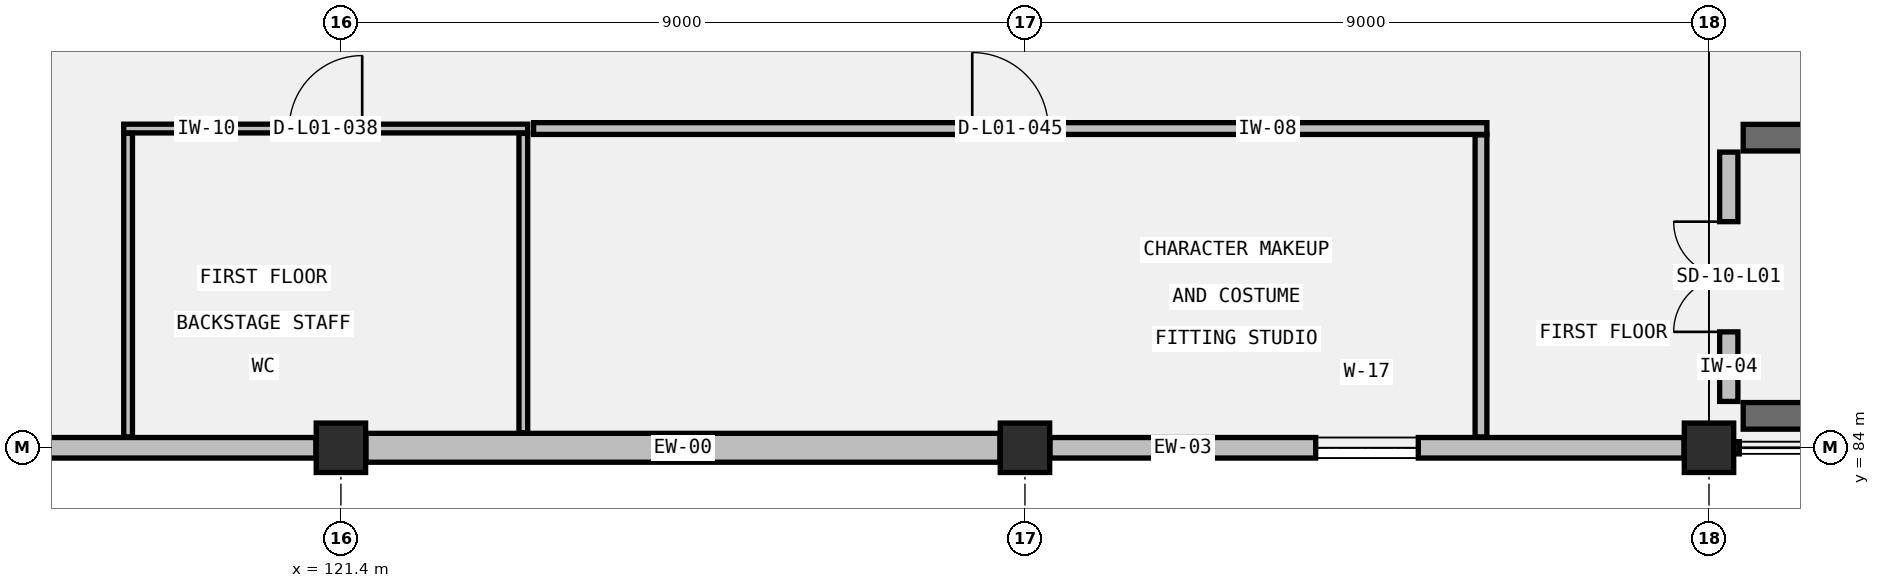
"""IFC4 building model, lengths in metres.
Left out: names, types, materials, properties, quantities, classifications, styles, units other than length and angle.
Written with IfcOpenShell. Run it as: python <this file> out.ifc"""

import sys

from ifc_helpers import new_model, si_unit, direction, frame, frame_2d, origin, origin_2d, place, context, subcontext, project, spatial, rectangle, extrude, element, fill, save


model = new_model("IFC4")
c1 = context("Model", 3, precision=1e-05, world=origin(), true_north=direction((0.0, 1.0)))
c2 = subcontext(c1, "Body", "Model", "MODEL_VIEW")
j1 = project(units=[si_unit("LENGTHUNIT", "METRE"), si_unit("PLANEANGLEUNIT", "RADIAN")], contexts=[c1])
p1 = place(None, origin())
s1 = spatial("IfcSite", under=j1, at=p1, CompositionType="ELEMENT")
p2 = place(p1, origin())
s2 = spatial("IfcBuilding", under=s1, at=p2, CompositionType="ELEMENT")
p3 = place(p2, frame((0.0, 0.0, 5.4)))
s3 = spatial("IfcBuildingStorey", under=s2, at=p3, CompositionType="ELEMENT", Elevation=5.4)
for number, where, z_axis, x_axis in (
    (1, (121.4, 84.0, 0.0), (0.0, 0.0, 1.0), (1.0, 0.0, 0.0)),
    (2, (130.4, 84.0, 0.0), (0.0, 0.0, 1.0), (1.0, 0.0, 0.0)),
    (3, (139.4, 84.0, 0.0), (0.0, 0.0, 1.0), (1.0, 0.0, 0.0)),
):
    element("IfcColumn", number, at=place(p3, frame(where, z_axis=z_axis, x_axis=x_axis)), inside=s3, PredefinedType="COLUMN", context=c2, shape_type="SweptSolid", body=[
        extrude(rectangle(XDim=0.65, YDim=0.65, at=origin_2d()), origin(), (0.0, 0.0, 1.0), 4.6),
    ])
for number, where, z_axis, x_axis in (
    (4, (139.85, 84.42, 0.0), (0.0, 0.0, 1.0), (1.0, 0.0, 0.0)),
    (5, (148.0, 88.08, 0.0), (0.0, 0.0, 1.0), (-1.0, 0.0, 0.0)),
):
    element("IfcWall", number, at=place(p3, frame(where, z_axis=z_axis, x_axis=x_axis)), inside=s3, PredefinedType="SHEAR", context=c2, shape_type="SweptSolid", body=[
        extrude(rectangle(XDim=8.15, YDim=0.35, at=frame_2d((4.075, 0.0))), origin(), (0.0, 0.0, 1.0), 4.36),
    ])
p4 = place(p3, frame((112.854, 84.0, 0.0), z_axis=(0.0, 0.0, 1.0), x_axis=(1.0, 0.0, 0.0)))
e6 = element("IfcWall", 6, at=p4, inside=s3, PredefinedType="STANDARD", context=c2, shape_type="SweptSolid", body=[
    extrude(rectangle(XDim=8.217, YDim=0.27, at=frame_2d((4.108, 0.0))), origin(), (0.0, 0.0, 1.0), 3.898),
])
p5 = place(p4, frame((3.634, 0.0, 0.95)))
e7 = element("IfcOpeningElement", 7, at=p5, cuts=e6, PredefinedType="OPENING", context=c2, shape_type="SweptSolid", body=[
    extrude(rectangle(XDim=0.95, YDim=1.55, at=frame_2d((0.475, 0.775))), frame((0.0, 0.145, 0.0), z_axis=(0.0, -1.0, 0.0), x_axis=(1.0, 0.0, 0.0)), (0.0, 0.0, 1.0), 0.29),
])
p6 = place(p3, frame((121.729, 84.0, 0.0), z_axis=(0.0, 0.0, 1.0), x_axis=(1.0, 0.0, 0.0)))
e8 = element("IfcWall", 8, at=p6, inside=s3, PredefinedType="STANDARD", context=c2, shape_type="SweptSolid", body=[
    extrude(rectangle(XDim=8.342, YDim=0.38, at=frame_2d((4.171, 0.0))), origin(), (0.0, 0.0, 1.0), 3.898),
])
p7 = place(p3, frame((130.729, 84.0, 0.0), z_axis=(0.0, 0.0, 1.0), x_axis=(1.0, 0.0, 0.0)))
e9 = element("IfcWall", 9, at=p7, inside=s3, PredefinedType="STANDARD", context=c2, shape_type="SweptSolid", body=[
    extrude(rectangle(XDim=8.342, YDim=0.27, at=frame_2d((4.171, 0.0))), origin(), (0.0, 0.0, 1.0), 3.898),
])
p8 = place(p7, frame((3.496, 0.0, 0.95)))
e10 = element("IfcOpeningElement", 10, at=p8, cuts=e9, PredefinedType="OPENING", context=c2, shape_type="SweptSolid", body=[
    extrude(rectangle(XDim=1.35, YDim=1.85, at=frame_2d((0.675, 0.925))), frame((0.0, 0.145, 0.0), z_axis=(0.0, -1.0, 0.0), x_axis=(1.0, 0.0, 0.0)), (0.0, 0.0, 1.0), 0.29),
])
p9 = place(p3, frame((139.66, 84.61, 0.0), z_axis=(0.0, 0.0, 1.0), x_axis=(0.0, 1.0, 0.0)))
e11 = element("IfcWall", 11, at=p9, inside=s3, PredefinedType="STANDARD", context=c2, shape_type="SweptSolid", body=[
    extrude(rectangle(XDim=3.28, YDim=0.24, at=frame_2d((1.64, 0.0))), origin(), (0.0, 0.0, 1.0), 4.36),
])
p10 = place(p9, frame((0.915, 0.0, 0.0)))
e12 = element("IfcOpeningElement", 12, at=p10, cuts=e11, PredefinedType="OPENING", context=c2, shape_type="SweptSolid", body=[
    extrude(rectangle(XDim=1.45, YDim=2.2, at=frame_2d((0.725, 1.1))), frame((0.0, 0.13, 0.0), z_axis=(0.0, -1.0, 0.0), x_axis=(1.0, 0.0, 0.0)), (0.0, 0.0, 1.0), 0.26),
])
p11 = place(p3, frame((118.542, 88.2, 0.0), z_axis=(0.0, 0.0, 1.0), x_axis=(1.0, 0.0, 0.0)))
e13 = element("IfcWall", 13, at=p11, inside=s3, PredefinedType="PARTITIONING", context=c2, shape_type="SweptSolid", body=[
    extrude(rectangle(XDim=5.315, YDim=0.115, at=frame_2d((2.657, 0.0))), origin(), (0.0, 0.0, 1.0), 3.988),
])
p12 = place(p11, frame((2.177, 0.0, 0.0)))
e14 = element("IfcOpeningElement", 14, at=p12, cuts=e13, PredefinedType="OPENING", context=c2, shape_type="SweptSolid", body=[
    extrude(rectangle(XDim=0.96, YDim=2.08, at=frame_2d((0.48, 1.04))), frame((0.0, 0.067, 0.0), z_axis=(0.0, -1.0, 0.0), x_axis=(1.0, 0.0, 0.0)), (0.0, 0.0, 1.0), 0.135),
])
p13 = place(p3, frame((123.8, 84.198, 0.0), z_axis=(0.0, 0.0, 1.0), x_axis=(0.0, 1.0, 0.0)))
e15 = element("IfcWall", 15, at=p13, inside=s3, PredefinedType="PARTITIONING", context=c2, shape_type="SweptSolid", body=[
    extrude(rectangle(XDim=3.938, YDim=0.115, at=frame_2d((1.969, 0.0))), origin(), (0.0, 0.0, 1.0), 3.898),
])
p14 = place(p3, frame((118.6, 84.143, 0.0), z_axis=(0.0, 0.0, 1.0), x_axis=(0.0, 1.0, 0.0)))
e16 = element("IfcWall", 16, at=p14, inside=s3, PredefinedType="PARTITIONING", context=c2, shape_type="SweptSolid", body=[
    extrude(rectangle(XDim=3.993, YDim=0.115, at=frame_2d((1.997, 0.0))), origin(), (0.0, 0.0, 1.0), 3.898),
])
p15 = place(p3, frame((123.935, 88.2, 0.0), z_axis=(0.0, 0.0, 1.0), x_axis=(1.0, 0.0, 0.0)))
e17 = element("IfcWall", 17, at=p15, inside=s3, PredefinedType="PARTITIONING", context=c2, shape_type="SweptSolid", body=[
    extrude(rectangle(XDim=12.542, YDim=0.155, at=frame_2d((6.271, 0.0))), origin(), (0.0, 0.0, 1.0), 3.988),
])
p16 = place(p15, frame((5.771, 0.0, 0.0)))
e18 = element("IfcOpeningElement", 18, at=p16, cuts=e17, PredefinedType="OPENING", context=c2, shape_type="SweptSolid", body=[
    extrude(rectangle(XDim=1.0, YDim=2.15, at=frame_2d((0.5, 1.075))), frame((0.0, 0.087, 0.0), z_axis=(0.0, -1.0, 0.0), x_axis=(1.0, 0.0, 0.0)), (0.0, 0.0, 1.0), 0.175),
])
p17 = place(p3, frame((136.4, 84.143, 0.0), z_axis=(0.0, 0.0, 1.0), x_axis=(0.0, 1.0, 0.0)))
e19 = element("IfcWall", 19, at=p17, inside=s3, PredefinedType="PARTITIONING", context=c2, shape_type="SweptSolid", body=[
    extrude(rectangle(XDim=3.973, YDim=0.155, at=frame_2d((1.987, 0.0))), origin(), (0.0, 0.0, 1.0), 3.898),
])
p18 = place(p8, origin())
e20 = element("IfcWindow", 20, at=p18, inside=s3, PartitioningType="SINGLE_PANEL", PredefinedType="WINDOW", context=c2, shape_type="SweptSolid", body=[
    extrude(rectangle(XDim=1.35, YDim=1.85, at=frame_2d((0.675, 0.925))), frame((0.0, 0.03, 0.0), z_axis=(0.0, -1.0, 0.0), x_axis=(1.0, 0.0, 0.0)), (0.0, 0.0, 1.0), 0.06),
])
fill(e10, e20)
p19 = place(p10, origin())
e21 = element("IfcDoor", 21, at=p19, inside=s3, OperationType="DOUBLE_DOOR_SINGLE_SWING", PredefinedType="DOOR", context=c2, shape_type="SweptSolid", body=[
    extrude(rectangle(XDim=1.45, YDim=2.2, at=frame_2d((0.725, 1.1))), frame((0.0, 0.025, 0.0), z_axis=(0.0, -1.0, 0.0), x_axis=(1.0, 0.0, 0.0)), (0.0, 0.0, 1.0), 0.05),
])
fill(e12, e21)
p20 = place(p12, origin())
e22 = element("IfcDoor", 22, at=p20, inside=s3, OperationType="SINGLE_SWING_RIGHT", PredefinedType="DOOR", context=c2, shape_type="SweptSolid", body=[
    extrude(rectangle(XDim=0.96, YDim=2.08, at=frame_2d((0.48, 1.04))), frame((0.0, 0.025, 0.0), z_axis=(0.0, -1.0, 0.0), x_axis=(1.0, 0.0, 0.0)), (0.0, 0.0, 1.0), 0.05),
])
fill(e14, e22)
p21 = place(p16, origin())
e23 = element("IfcDoor", 23, at=p21, inside=s3, OperationType="SINGLE_SWING_LEFT", PredefinedType="DOOR", context=c2, shape_type="SweptSolid", body=[
    extrude(rectangle(XDim=1.0, YDim=2.15, at=frame_2d((0.5, 1.075))), frame((0.0, 0.025, 0.0), z_axis=(0.0, -1.0, 0.0), x_axis=(1.0, 0.0, 0.0)), (0.0, 0.0, 1.0), 0.05),
])
fill(e18, e23)
save(model, sys.argv[1])
